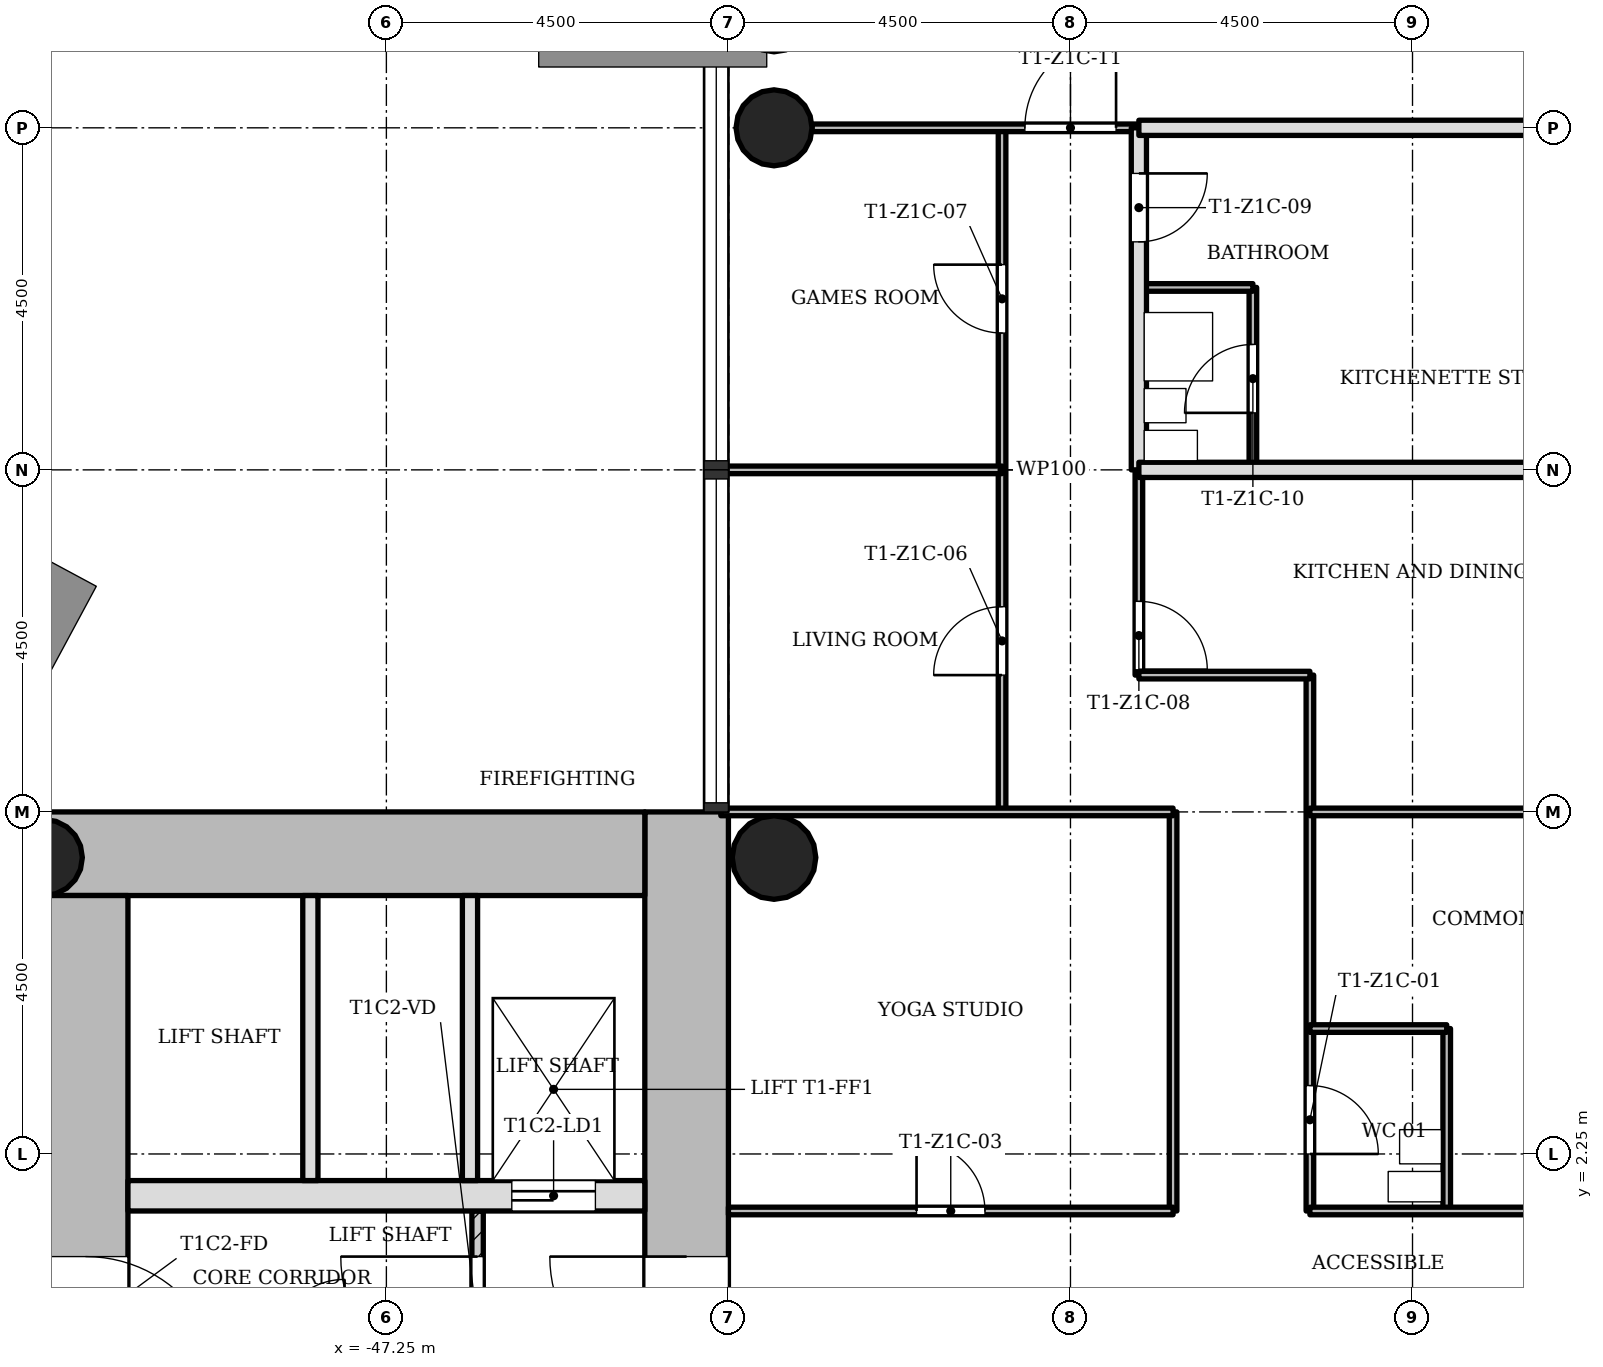
"""IFC4 building model, lengths in metres.
Left out: names, types, materials, properties, quantities, classifications, styles, units other than length and angle.
Written with IfcOpenShell. Run it as: python <this file> out.ifc"""

import sys

from ifc_helpers import new_model, si_unit, direction, frame, frame_2d, origin, origin_2d, place, context, subcontext, project, spatial, rectangle, hollow_circle, extrude, element, fill, save


model = new_model("IFC4")
c1 = context("Model", 3, precision=1e-05, world=origin(), true_north=direction((0.0, 1.0)))
c2 = subcontext(c1, "Body", "Model", "MODEL_VIEW")
j1 = project(units=[si_unit("LENGTHUNIT", "METRE"), si_unit("PLANEANGLEUNIT", "RADIAN")], contexts=[c1])
p1 = place(None, origin())
s1 = spatial("IfcSite", under=j1, at=p1, CompositionType="ELEMENT")
p2 = place(p1, origin())
s2 = spatial("IfcBuilding", under=s1, at=p2, CompositionType="ELEMENT")
p3 = place(p2, frame((0.0, 0.0, 51.7)))
s3 = spatial("IfcBuildingStorey", under=s2, at=p3, CompositionType="ELEMENT", Elevation=51.7)
p4 = place(p3, frame((-43.3, -5.65, 0.0), z_axis=(0.0, 0.0, 1.0), x_axis=(0.0, 1.0, 0.0)))
e1 = element("IfcWall", 1, at=p4, inside=s3, PredefinedType="SHEAR", context=c2, shape_type="SweptSolid", body=[
    extrude(rectangle(XDim=12.4, YDim=1.1, at=frame_2d((6.2, 0.0))), origin(), (0.0, 0.0, 1.0), 3.4),
])
p5 = place(p4, frame((4.75, 0.0, 0.0)))
e2 = element("IfcOpeningElement", 2, at=p5, cuts=e1, PredefinedType="OPENING", context=c2, shape_type="SweptSolid", body=[
    extrude(rectangle(XDim=1.8, YDim=2.1, at=frame_2d((0.9, 1.05))), frame((0.0, 0.56, 0.0), z_axis=(0.0, -1.0, 0.0), x_axis=(1.0, 0.0, 0.0)), (0.0, 0.0, 1.0), 1.12),
])
p6 = place(p3, frame((-43.85, 6.2, 0.0), z_axis=(0.0, 0.0, 1.0), x_axis=(-1.0, 0.0, 0.0)))
e3 = element("IfcWall", 3, at=p6, inside=s3, PredefinedType="SHEAR", context=c2, shape_type="SweptSolid", body=[
    extrude(rectangle(XDim=7.9, YDim=1.1, at=frame_2d((3.95, 0.0))), origin(), (0.0, 0.0, 1.0), 3.4),
])
p7 = place(p3, frame((-51.2, 5.65, 0.0), z_axis=(0.0, 0.0, 1.0), x_axis=(0.0, -1.0, 0.0)))
e4 = element("IfcWall", 4, at=p7, inside=s3, PredefinedType="SHEAR", context=c2, shape_type="SweptSolid", body=[
    extrude(rectangle(XDim=12.4, YDim=1.1, at=frame_2d((6.2, 0.0))), origin(), (0.0, 0.0, 1.0), 3.4),
])
p8 = place(p7, frame((4.75, 0.0, 0.0)))
e5 = element("IfcOpeningElement", 5, at=p8, cuts=e4, PredefinedType="OPENING", context=c2, shape_type="SweptSolid", body=[
    extrude(rectangle(XDim=1.8, YDim=2.1, at=frame_2d((0.9, 1.05))), frame((0.0, 0.56, 0.0), z_axis=(0.0, -1.0, 0.0), x_axis=(1.0, 0.0, 0.0)), (0.0, 0.0, 1.0), 1.12),
])
p9 = place(p3, frame((-50.65, 1.7, 0.0), z_axis=(0.0, 0.0, 1.0), x_axis=(1.0, 0.0, 0.0)))
e6 = element("IfcWall", 6, at=p9, inside=s3, PredefinedType="SHEAR", context=c2, shape_type="SweptSolid", body=[
    extrude(rectangle(XDim=6.8, YDim=0.4, at=frame_2d((3.4, 0.0))), origin(), (0.0, 0.0, 1.0), 3.4),
])
p10 = place(p9, frame((5.05, 0.0, 0.0)))
e7 = element("IfcOpeningElement", 7, at=p10, cuts=e6, PredefinedType="OPENING", context=c2, shape_type="SweptSolid", body=[
    extrude(rectangle(XDim=1.1, YDim=2.1, at=frame_2d((0.55, 1.05))), frame((0.0, 0.21, 0.0), z_axis=(0.0, -1.0, 0.0), x_axis=(1.0, 0.0, 0.0)), (0.0, 0.0, 1.0), 0.42),
])
for number, where, z_axis, x_axis in (
    (8, (-42.15, 15.75, 0.0), (0.0, 0.0, 1.0), (1.0, 0.0, 0.0)),
    (9, (-51.75, 6.15, 0.0), (0.0, 0.0, 1.0), (1.0, 0.0, 0.0)),
):
    element("IfcColumn", number, at=place(p3, frame(where, z_axis=z_axis, x_axis=x_axis)), inside=s3, PredefinedType="COLUMN", context=c2, shape_type="SweptSolid", body=[
        extrude(hollow_circle(Radius=0.5, WallThickness=0.036, at=origin_2d()), origin(), (0.0, 0.0, 1.0), 3.4),
    ])
p11 = place(p3, frame((-42.15, 6.15, 0.0), z_axis=(0.0, 0.0, 1.0), x_axis=(1.0, 0.0, 0.0)))
e10 = element("IfcColumn", 10, at=p11, inside=s3, PredefinedType="COLUMN", context=c2, shape_type="SweptSolid", body=[
    extrude(hollow_circle(Radius=0.55, WallThickness=0.04, at=origin_2d()), origin(), (0.0, 0.0, 1.0), 3.4),
])
p12 = place(p3, frame((-46.05, 1.5, 0.0), z_axis=(0.0, 0.0, 1.0), x_axis=(0.0, -1.0, 0.0)))
e11 = element("IfcWall", 11, at=p12, inside=s3, PredefinedType="PARTITIONING", context=c2, shape_type="SweptSolid", body=[
    extrude(rectangle(XDim=3.0, YDim=0.15, at=frame_2d((1.5, 0.0))), origin(), (0.0, 0.0, 1.0), 3.0),
])
p13 = place(p12, frame((0.6, 0.0, 0.0)))
e12 = element("IfcOpeningElement", 12, at=p13, cuts=e11, PredefinedType="OPENING", context=c2, shape_type="SweptSolid", body=[
    extrude(rectangle(XDim=1.8, YDim=2.1, at=frame_2d((0.9, 1.05))), frame((0.0, 0.085, 0.0), z_axis=(0.0, -1.0, 0.0), x_axis=(1.0, 0.0, 0.0)), (0.0, 0.0, 1.0), 0.17),
])
for number, where, z_axis, x_axis in (
    (13, (-46.15, 5.65, 0.0), (0.0, 0.0, 1.0), (0.0, -1.0, 0.0)),
    (14, (-48.25, 5.65, 0.0), (0.0, 0.0, 1.0), (0.0, -1.0, 0.0)),
):
    element("IfcWall", number, at=place(p3, frame(where, z_axis=z_axis, x_axis=x_axis)), inside=s3, PredefinedType="SOLIDWALL", context=c2, shape_type="SweptSolid", body=[
        extrude(rectangle(XDim=3.75, YDim=0.2, at=frame_2d((1.875, 0.0))), origin(), (0.0, 0.0, 1.0), 3.0),
    ])
p14 = place(p3, frame((-39.15, 6.75, 0.0), z_axis=(0.0, 0.0, 1.0), x_axis=(0.0, 1.0, 0.0)))
e15 = element("IfcWall", 15, at=p14, inside=s3, PredefinedType="PARTITIONING", context=c2, shape_type="SweptSolid", body=[
    extrude(rectangle(XDim=9.0, YDim=0.1, at=frame_2d((4.5, 0.0))), origin(), (0.0, 0.0, 1.0), 3.0),
])
p15 = place(p14, frame((1.8, 0.0, 0.0)))
e16 = element("IfcOpeningElement", 16, at=p15, cuts=e15, PredefinedType="OPENING", context=c2, shape_type="SweptSolid", body=[
    extrude(rectangle(XDim=0.9, YDim=2.1, at=frame_2d((0.45, 1.05))), frame((0.0, 0.06, 0.0), z_axis=(0.0, -1.0, 0.0), x_axis=(1.0, 0.0, 0.0)), (0.0, 0.0, 1.0), 0.12),
])
p16 = place(p14, frame((6.3, 0.0, 0.0)))
e17 = element("IfcOpeningElement", 17, at=p16, cuts=e15, PredefinedType="OPENING", context=c2, shape_type="SweptSolid", body=[
    extrude(rectangle(XDim=0.9, YDim=2.1, at=frame_2d((0.45, 1.05))), frame((0.0, 0.06, 0.0), z_axis=(0.0, -1.0, 0.0), x_axis=(1.0, 0.0, 0.0)), (0.0, 0.0, 1.0), 0.12),
])
p17 = place(p3, frame((-37.35, 8.55, 0.0), z_axis=(0.0, 0.0, 1.0), x_axis=(0.0, 1.0, 0.0)))
e18 = element("IfcWall", 18, at=p17, inside=s3, PredefinedType="PARTITIONING", context=c2, shape_type="SweptSolid", body=[
    extrude(rectangle(XDim=2.7, YDim=0.1, at=frame_2d((1.35, 0.0))), origin(), (0.0, 0.0, 1.0), 3.0),
])
p18 = place(p17, frame((0.07, 0.0, 0.0)))
e19 = element("IfcOpeningElement", 19, at=p18, cuts=e18, PredefinedType="OPENING", context=c2, shape_type="SweptSolid", body=[
    extrude(rectangle(XDim=0.9, YDim=2.1, at=frame_2d((0.45, 1.05))), frame((0.0, 0.06, 0.0), z_axis=(0.0, -1.0, 0.0), x_axis=(1.0, 0.0, 0.0)), (0.0, 0.0, 1.0), 0.12),
])
p19 = place(p3, frame((-37.35, 11.25, 0.0), z_axis=(0.0, 0.0, 1.0), x_axis=(0.0, 1.0, 0.0)))
e20 = element("IfcWall", 20, at=p19, inside=s3, PredefinedType="SOLIDWALL", context=c2, shape_type="SweptSolid", body=[
    extrude(rectangle(XDim=4.5, YDim=0.2, at=frame_2d((2.25, 0.0))), origin(), (0.0, 0.0, 1.0), 3.0),
])
p20 = place(p19, frame((3.0, 0.0, 0.0)))
e21 = element("IfcOpeningElement", 21, at=p20, cuts=e20, PredefinedType="OPENING", context=c2, shape_type="SweptSolid", body=[
    extrude(rectangle(XDim=0.9, YDim=2.1, at=frame_2d((0.45, 1.05))), frame((0.0, 0.11, 0.0), z_axis=(0.0, -1.0, 0.0), x_axis=(1.0, 0.0, 0.0)), (0.0, 0.0, 1.0), 0.22),
])
p21 = place(p3, frame((-36.9, 1.5, 0.0), z_axis=(0.0, 0.0, 1.0), x_axis=(0.0, 1.0, 0.0)))
e22 = element("IfcWall", 22, at=p21, inside=s3, PredefinedType="PARTITIONING", context=c2, shape_type="SweptSolid", body=[
    extrude(rectangle(XDim=5.25, YDim=0.1, at=frame_2d((2.625, 0.0))), origin(), (0.0, 0.0, 1.0), 3.0),
])
p22 = place(p3, frame((-35.85, 11.25, 0.0), z_axis=(0.0, 0.0, 1.0), x_axis=(0.0, 1.0, 0.0)))
e23 = element("IfcWall", 23, at=p22, inside=s3, PredefinedType="PARTITIONING", context=c2, shape_type="SweptSolid", body=[
    extrude(rectangle(XDim=2.4, YDim=0.1, at=frame_2d((1.2, 0.0))), origin(), (0.0, 0.0, 1.0), 3.0),
])
p23 = place(p22, frame((0.75, 0.0, 0.0)))
e24 = element("IfcOpeningElement", 24, at=p23, cuts=e23, PredefinedType="OPENING", context=c2, shape_type="SweptSolid", body=[
    extrude(rectangle(XDim=0.9, YDim=2.1, at=frame_2d((0.45, 1.05))), frame((0.0, 0.06, 0.0), z_axis=(0.0, -1.0, 0.0), x_axis=(1.0, 0.0, 0.0)), (0.0, 0.0, 1.0), 0.12),
])
p24 = place(p3, frame((-35.1, 1.5, 0.0), z_axis=(0.0, 0.0, 1.0), x_axis=(0.0, 1.0, 0.0)))
e25 = element("IfcWall", 25, at=p24, inside=s3, PredefinedType="PARTITIONING", context=c2, shape_type="SweptSolid", body=[
    extrude(rectangle(XDim=7.05, YDim=0.1, at=frame_2d((3.525, 0.0))), origin(), (0.0, 0.0, 1.0), 3.0),
])
p25 = place(p24, frame((0.75, 0.0, 0.0)))
e26 = element("IfcOpeningElement", 26, at=p25, cuts=e25, PredefinedType="OPENING", context=c2, shape_type="SweptSolid", body=[
    extrude(rectangle(XDim=0.9, YDim=2.1, at=frame_2d((0.45, 1.05))), frame((0.0, 0.06, 0.0), z_axis=(0.0, -1.0, 0.0), x_axis=(1.0, 0.0, 0.0)), (0.0, 0.0, 1.0), 0.12),
])
p26 = place(p3, frame((-33.3, 1.5, 0.0), z_axis=(0.0, 0.0, 1.0), x_axis=(0.0, 1.0, 0.0)))
e27 = element("IfcWall", 27, at=p26, inside=s3, PredefinedType="PARTITIONING", context=c2, shape_type="SweptSolid", body=[
    extrude(rectangle(XDim=2.4, YDim=0.1, at=frame_2d((1.2, 0.0))), origin(), (0.0, 0.0, 1.0), 3.0),
])
p27 = place(p3, frame((-42.75, 1.5, 0.0), z_axis=(0.0, 0.0, 1.0), x_axis=(1.0, 0.0, 0.0)))
e28 = element("IfcWall", 28, at=p27, inside=s3, PredefinedType="PARTITIONING", context=c2, shape_type="SweptSolid", body=[
    extrude(rectangle(XDim=5.85, YDim=0.1, at=frame_2d((2.925, 0.0))), origin(), (0.0, 0.0, 1.0), 3.0),
])
p28 = place(p27, frame((2.475, 0.0, 0.0)))
e29 = element("IfcOpeningElement", 29, at=p28, cuts=e28, PredefinedType="OPENING", context=c2, shape_type="SweptSolid", body=[
    extrude(rectangle(XDim=0.9, YDim=2.1, at=frame_2d((0.45, 1.05))), frame((0.0, 0.06, 0.0), z_axis=(0.0, -1.0, 0.0), x_axis=(1.0, 0.0, 0.0)), (0.0, 0.0, 1.0), 0.12),
])
p29 = place(p3, frame((-35.1, 1.5, 0.0), z_axis=(0.0, 0.0, 1.0), x_axis=(1.0, 0.0, 0.0)))
e30 = element("IfcWall", 30, at=p29, inside=s3, PredefinedType="PARTITIONING", context=c2, shape_type="SweptSolid", body=[
    extrude(rectangle(XDim=5.85, YDim=0.1, at=frame_2d((2.925, 0.0))), origin(), (0.0, 0.0, 1.0), 3.0),
])
p30 = place(p29, frame((3.375, 0.0, 0.0)))
e31 = element("IfcOpeningElement", 31, at=p30, cuts=e30, PredefinedType="OPENING", context=c2, shape_type="SweptSolid", body=[
    extrude(rectangle(XDim=0.9, YDim=2.1, at=frame_2d((0.45, 1.05))), frame((0.0, 0.06, 0.0), z_axis=(0.0, -1.0, 0.0), x_axis=(1.0, 0.0, 0.0)), (0.0, 0.0, 1.0), 0.12),
])
p31 = place(p3, frame((-35.1, 3.9, 0.0), z_axis=(0.0, 0.0, 1.0), x_axis=(1.0, 0.0, 0.0)))
e32 = element("IfcWall", 32, at=p31, inside=s3, PredefinedType="PARTITIONING", context=c2, shape_type="SweptSolid", body=[
    extrude(rectangle(XDim=1.8, YDim=0.1, at=frame_2d((0.9, 0.0))), origin(), (0.0, 0.0, 1.0), 3.0),
])
for number, where, z_axis, x_axis in (
    (33, (-42.85, 6.75, 0.0), (0.0, 0.0, 1.0), (1.0, 0.0, 0.0)),
    (34, (-35.1, 6.75, 0.0), (0.0, 0.0, 1.0), (1.0, 0.0, 0.0)),
):
    element("IfcWall", number, at=place(p3, frame(where, z_axis=z_axis, x_axis=x_axis)), inside=s3, PredefinedType="PARTITIONING", context=c2, shape_type="SweptSolid", body=[
        extrude(rectangle(XDim=5.95, YDim=0.1, at=frame_2d((2.975, 0.0))), origin(), (0.0, 0.0, 1.0), 3.0),
    ])
p32 = place(p3, frame((-37.35, 8.55, 0.0), z_axis=(0.0, 0.0, 1.0), x_axis=(1.0, 0.0, 0.0)))
e35 = element("IfcWall", 35, at=p32, inside=s3, PredefinedType="PARTITIONING", context=c2, shape_type="SweptSolid", body=[
    extrude(rectangle(XDim=2.25, YDim=0.1, at=frame_2d((1.125, 0.0))), origin(), (0.0, 0.0, 1.0), 3.0),
])
p33 = place(p3, frame((-42.85, 11.25, 0.0), z_axis=(0.0, 0.0, 1.0), x_axis=(1.0, 0.0, 0.0)))
e36 = element("IfcWall", 36, at=p33, inside=s3, PredefinedType="PARTITIONING", context=c2, shape_type="SweptSolid", body=[
    extrude(rectangle(XDim=3.7, YDim=0.1, at=frame_2d((1.85, 0.0))), origin(), (0.0, 0.0, 1.0), 3.0),
])
p34 = place(p3, frame((-37.35, 11.25, 0.0), z_axis=(0.0, 0.0, 1.0), x_axis=(1.0, 0.0, 0.0)))
e37 = element("IfcWall", 37, at=p34, inside=s3, PredefinedType="SOLIDWALL", context=c2, shape_type="SweptSolid", body=[
    extrude(rectangle(XDim=8.2, YDim=0.2, at=frame_2d((4.1, 0.0))), origin(), (0.0, 0.0, 1.0), 3.0),
])
p35 = place(p3, frame((-37.35, 13.65, 0.0), z_axis=(0.0, 0.0, 1.0), x_axis=(1.0, 0.0, 0.0)))
e38 = element("IfcWall", 38, at=p35, inside=s3, PredefinedType="PARTITIONING", context=c2, shape_type="SweptSolid", body=[
    extrude(rectangle(XDim=1.5, YDim=0.1, at=frame_2d((0.75, 0.0))), origin(), (0.0, 0.0, 1.0), 3.0),
])
p36 = place(p3, frame((-41.65, 15.75, 0.0), z_axis=(0.0, 0.0, 1.0), x_axis=(1.0, 0.0, 0.0)))
e39 = element("IfcWall", 39, at=p36, inside=s3, PredefinedType="PARTITIONING", context=c2, shape_type="SweptSolid", body=[
    extrude(rectangle(XDim=4.3, YDim=0.1, at=frame_2d((2.15, 0.0))), origin(), (0.0, 0.0, 1.0), 3.0),
])
p37 = place(p36, frame((2.8, 0.0, 0.0)))
e40 = element("IfcOpeningElement", 40, at=p37, cuts=e39, PredefinedType="OPENING", context=c2, shape_type="SweptSolid", body=[
    extrude(rectangle(XDim=1.2, YDim=2.1, at=frame_2d((0.6, 1.05))), frame((0.0, 0.06, 0.0), z_axis=(0.0, -1.0, 0.0), x_axis=(1.0, 0.0, 0.0)), (0.0, 0.0, 1.0), 0.12),
])
p38 = place(p3, frame((-37.35, 15.75, 0.0), z_axis=(0.0, 0.0, 1.0), x_axis=(1.0, 0.0, 0.0)))
e41 = element("IfcWall", 41, at=p38, inside=s3, PredefinedType="SOLIDWALL", context=c2, shape_type="SweptSolid", body=[
    extrude(rectangle(XDim=7.0, YDim=0.2, at=frame_2d((3.5, 0.0))), origin(), (0.0, 0.0, 1.0), 3.0),
])
p39 = place(p13, origin())
e42 = element("IfcDoor", 42, at=p39, inside=s3, OperationType="SINGLE_SWING_LEFT", PredefinedType="DOOR", context=c2, shape_type="SweptSolid", body=[
    extrude(rectangle(XDim=1.8, YDim=2.1, at=frame_2d((0.9, 1.05))), frame((0.0, 0.025, 0.0), z_axis=(0.0, -1.0, 0.0), x_axis=(1.0, 0.0, 0.0)), (0.0, 0.0, 1.0), 0.05),
])
fill(e12, e42)
p40 = place(p25, origin())
e43 = element("IfcDoor", 43, at=p40, inside=s3, OperationType="SINGLE_SWING_LEFT", PredefinedType="DOOR", context=c2, shape_type="SweptSolid", body=[
    extrude(rectangle(XDim=0.9, YDim=2.1, at=frame_2d((0.45, 1.05))), frame((0.0, 0.025, 0.0), z_axis=(0.0, -1.0, 0.0), x_axis=(1.0, 0.0, 0.0)), (0.0, 0.0, 1.0), 0.05),
])
fill(e26, e43)
p41 = place(p28, origin())
e44 = element("IfcDoor", 44, at=p41, inside=s3, OperationType="SINGLE_SWING_RIGHT", PredefinedType="DOOR", context=c2, shape_type="SweptSolid", body=[
    extrude(rectangle(XDim=0.9, YDim=2.1, at=frame_2d((0.45, 1.05))), frame((0.0, 0.025, 0.0), z_axis=(0.0, -1.0, 0.0), x_axis=(1.0, 0.0, 0.0)), (0.0, 0.0, 1.0), 0.05),
])
fill(e29, e44)
p42 = place(p15, origin())
e45 = element("IfcDoor", 45, at=p42, inside=s3, OperationType="SINGLE_SWING_RIGHT", PredefinedType="DOOR", context=c2, shape_type="SweptSolid", body=[
    extrude(rectangle(XDim=0.9, YDim=2.1, at=frame_2d((0.45, 1.05))), frame((0.0, 0.025, 0.0), z_axis=(0.0, -1.0, 0.0), x_axis=(1.0, 0.0, 0.0)), (0.0, 0.0, 1.0), 0.05),
])
fill(e16, e45)
p43 = place(p16, origin())
e46 = element("IfcDoor", 46, at=p43, inside=s3, OperationType="SINGLE_SWING_LEFT", PredefinedType="DOOR", context=c2, shape_type="SweptSolid", body=[
    extrude(rectangle(XDim=0.9, YDim=2.1, at=frame_2d((0.45, 1.05))), frame((0.0, 0.025, 0.0), z_axis=(0.0, -1.0, 0.0), x_axis=(1.0, 0.0, 0.0)), (0.0, 0.0, 1.0), 0.05),
])
fill(e17, e46)
p44 = place(p18, origin())
e47 = element("IfcDoor", 47, at=p44, inside=s3, OperationType="SINGLE_SWING_LEFT", PredefinedType="DOOR", context=c2, shape_type="SweptSolid", body=[
    extrude(rectangle(XDim=0.9, YDim=2.1, at=frame_2d((0.45, 1.05))), frame((0.0, 0.025, 0.0), z_axis=(0.0, -1.0, 0.0), x_axis=(1.0, 0.0, 0.0)), (0.0, 0.0, 1.0), 0.05),
])
fill(e19, e47)
p45 = place(p20, origin())
e48 = element("IfcDoor", 48, at=p45, inside=s3, OperationType="SINGLE_SWING_RIGHT", PredefinedType="DOOR", context=c2, shape_type="SweptSolid", body=[
    extrude(rectangle(XDim=0.9, YDim=2.1, at=frame_2d((0.45, 1.05))), frame((0.0, 0.025, 0.0), z_axis=(0.0, -1.0, 0.0), x_axis=(1.0, 0.0, 0.0)), (0.0, 0.0, 1.0), 0.05),
])
fill(e21, e48)
p46 = place(p23, origin())
e49 = element("IfcDoor", 49, at=p46, inside=s3, OperationType="SINGLE_SWING_RIGHT", PredefinedType="DOOR", context=c2, shape_type="SweptSolid", body=[
    extrude(rectangle(XDim=0.9, YDim=2.1, at=frame_2d((0.45, 1.05))), frame((0.0, 0.025, 0.0), z_axis=(0.0, -1.0, 0.0), x_axis=(1.0, 0.0, 0.0)), (0.0, 0.0, 1.0), 0.05),
])
fill(e24, e49)
p47 = place(p37, origin())
e50 = element("IfcDoor", 50, at=p47, inside=s3, OperationType="SINGLE_SWING_LEFT", PredefinedType="DOOR", context=c2, shape_type="SweptSolid", body=[
    extrude(rectangle(XDim=1.2, YDim=2.1, at=frame_2d((0.6, 1.05))), frame((0.0, 0.025, 0.0), z_axis=(0.0, -1.0, 0.0), x_axis=(1.0, 0.0, 0.0)), (0.0, 0.0, 1.0), 0.05),
])
fill(e40, e50)
p48 = place(p10, origin())
e51 = element("IfcDoor", 51, at=p48, inside=s3, OperationType="SLIDING_TO_LEFT", PredefinedType="DOOR", context=c2, shape_type="SweptSolid", body=[
    extrude(rectangle(XDim=1.1, YDim=2.1, at=frame_2d((0.55, 1.05))), frame((0.0, 0.025, 0.0), z_axis=(0.0, -1.0, 0.0), x_axis=(1.0, 0.0, 0.0)), (0.0, 0.0, 1.0), 0.05),
])
fill(e7, e51)
p49 = place(p5, origin())
e52 = element("IfcDoor", 52, at=p49, inside=s3, OperationType="SINGLE_SWING_LEFT", PredefinedType="DOOR", context=c2, shape_type="SweptSolid", body=[
    extrude(rectangle(XDim=1.8, YDim=2.1, at=frame_2d((0.9, 1.05))), frame((0.0, 0.025, 0.0), z_axis=(0.0, -1.0, 0.0), x_axis=(1.0, 0.0, 0.0)), (0.0, 0.0, 1.0), 0.05),
])
fill(e2, e52)
p50 = place(p8, origin())
e53 = element("IfcDoor", 53, at=p50, inside=s3, OperationType="SINGLE_SWING_LEFT", PredefinedType="DOOR", context=c2, shape_type="SweptSolid", body=[
    extrude(rectangle(XDim=1.8, YDim=2.1, at=frame_2d((0.9, 1.05))), frame((0.0, 0.025, 0.0), z_axis=(0.0, -1.0, 0.0), x_axis=(1.0, 0.0, 0.0)), (0.0, 0.0, 1.0), 0.05),
])
fill(e5, e53)
save(model, sys.argv[1])
